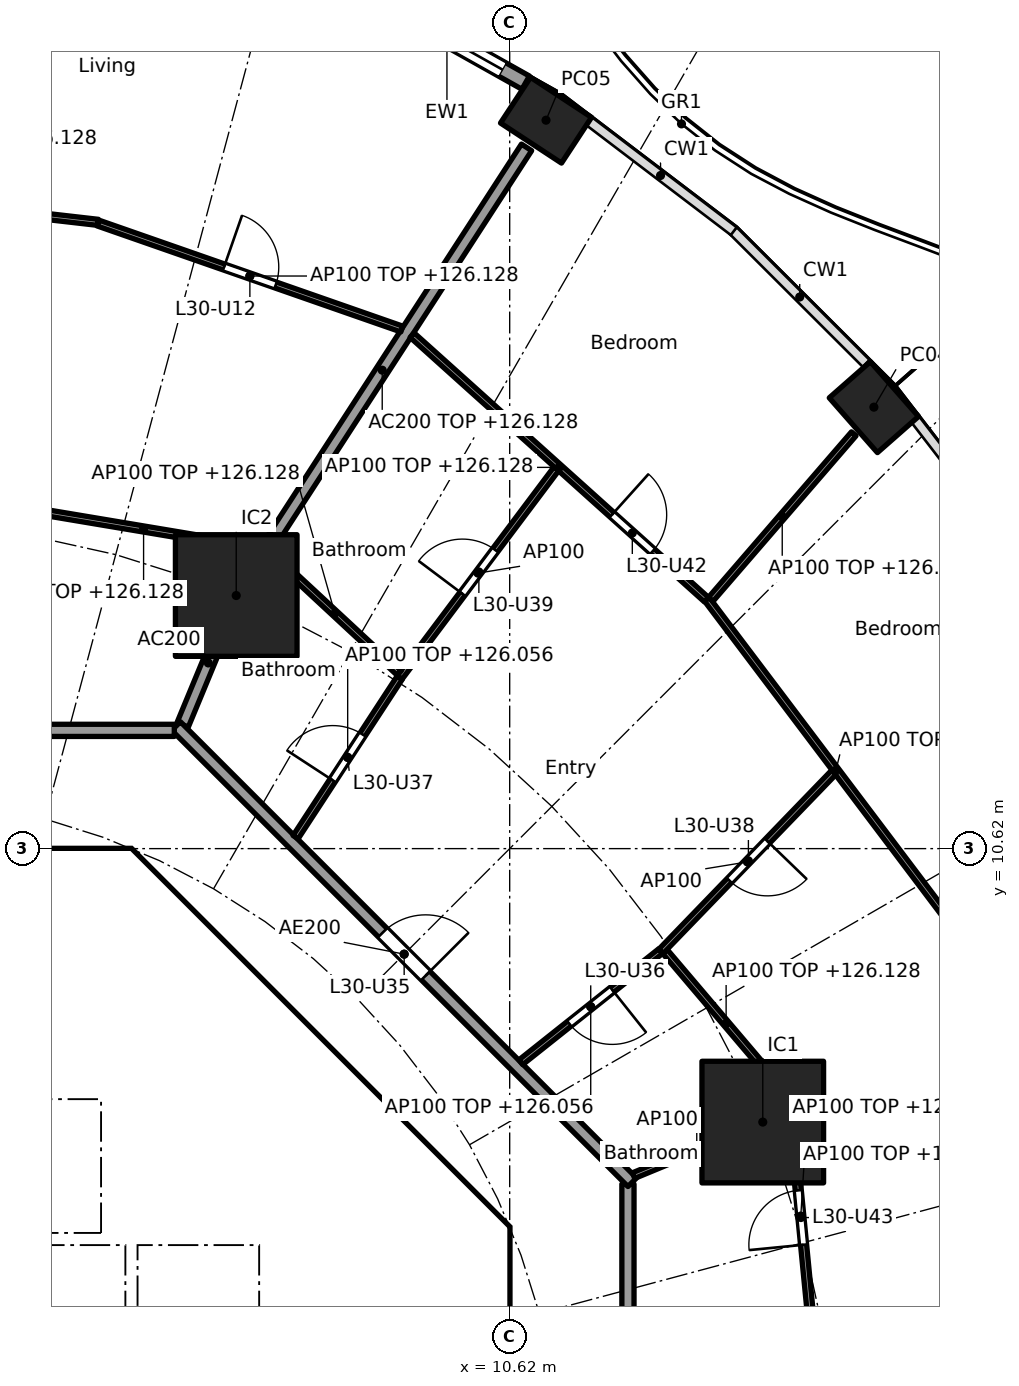
"""IFC4 building model, lengths in metres.
Left out: names, types, materials, properties, quantities, classifications, styles, units other than length and angle.
Written with IfcOpenShell. Run it as: python <this file> out.ifc"""

import sys

from ifc_helpers import new_model, si_unit, direction, frame, frame_2d, origin, origin_2d, place, context, subcontext, project, spatial, polyline, rectangle, hollow_rectangle, outline, extrude, element, fill, save


model = new_model("IFC4")
c1 = context("Model", 3, precision=1e-05, world=origin(), true_north=direction((0.0, 1.0)))
c2 = subcontext(c1, "Body", "Model", "MODEL_VIEW")
j1 = project(units=[si_unit("LENGTHUNIT", "METRE"), si_unit("PLANEANGLEUNIT", "RADIAN")], contexts=[c1])
p1 = place(None, origin())
s1 = spatial("IfcSite", under=j1, at=p1, CompositionType="ELEMENT")
p2 = place(p1, origin())
s2 = spatial("IfcBuilding", under=s1, at=p2, CompositionType="ELEMENT")
p3 = place(p2, frame((0.0, 0.0, 123.3)))
s3 = spatial("IfcBuildingStorey", under=s2, at=p3, CompositionType="ELEMENT", Elevation=123.3)
for number, where, z_axis, x_axis in (
    (1, (16.61, 17.88, 0.0), (0.0, 0.0, 1.0), (-0.66, 0.751, 0.0)),
    (2, (11.218, 22.599, 0.0), (0.0, 0.0, 1.0), (-0.836, 0.549, 0.0)),
):
    element("IfcColumn", number, at=place(p3, frame(where, z_axis=z_axis, x_axis=x_axis)), inside=s3, PredefinedType="COLUMN", context=c2, shape_type="SweptSolid", body=[
        extrude(hollow_rectangle(XDim=1.2, YDim=0.9, WallThickness=0.04, at=origin_2d()), origin(), (0.0, 0.0, 1.0), 3.7),
    ])
for number, where, z_axis, x_axis in (
    (3, (14.782, 6.123, 0.0), (0.0, 0.0, 1.0), (1.0, 0.0, 0.0)),
    (4, (6.123, 14.782, 0.0), (0.0, 0.0, 1.0), (1.0, 0.0, 0.0)),
):
    element("IfcColumn", number, at=place(p3, frame(where, z_axis=z_axis, x_axis=x_axis)), inside=s3, PredefinedType="COLUMN", context=c2, shape_type="SweptSolid", body=[
        extrude(rectangle(XDim=2.0, YDim=2.0, at=origin_2d()), origin(), (0.0, 0.0, 1.0), 3.7),
    ])
p4 = place(p3, frame((8.293, 24.67, 0.0), z_axis=(0.0, 0.0, 1.0), x_axis=(0.87206688547, -0.489386705241, 0.0)))
e5 = element("IfcWall", 5, at=p4, inside=s3, PredefinedType="SOLIDWALL", context=c2, shape_type="SweptSolid", body=[
    extrude(rectangle(XDim=2.97, YDim=0.25, at=frame_2d((1.485, 0.0))), origin(), (0.0, 0.0, 1.0), 3.44),
])
p5 = place(p4, frame((0.435, 0.0, 0.0)))
e6 = element("IfcOpeningElement", 6, at=p5, cuts=e5, PredefinedType="OPENING", context=c2, shape_type="SweptSolid", body=[
    extrude(rectangle(XDim=2.1, YDim=2.4, at=frame_2d((1.05, 1.2))), frame((0.0, 0.135, 0.0), z_axis=(0.0, -1.0, 0.0), x_axis=(1.0, 0.0, 0.0)), (0.0, 0.0, 1.0), 0.27),
])
p6 = place(p3, frame((9.988, 4.613, 0.0), z_axis=(0.0, 0.0, 1.0), x_axis=(-0.707106781187, 0.707106781187, 0.0)))
e7 = element("IfcWall", 7, at=p6, inside=s3, PredefinedType="SHEAR", context=c2, shape_type="SweptSolid", body=[
    extrude(rectangle(XDim=7.602, YDim=0.6, at=frame_2d((3.801, 0.0))), origin(), (0.0, 0.0, 1.0), 3.44),
])
p7 = place(p6, frame((3.201, 0.0, 0.0)))
e8 = element("IfcOpeningElement", 8, at=p7, cuts=e7, PredefinedType="OPENING", context=c2, shape_type="SweptSolid", body=[
    extrude(rectangle(XDim=1.2, YDim=2.1, at=frame_2d((0.6, 1.05))), frame((0.0, 0.31, 0.0), z_axis=(0.0, -1.0, 0.0), x_axis=(1.0, 0.0, 0.0)), (0.0, 0.0, 1.0), 0.62),
])
p8 = place(p3, frame((4.0, 4.3, 0.0), z_axis=(0.0, 0.0, 1.0), x_axis=(0.0, 1.0, 0.0)))
e9 = element("IfcWall", 9, at=p8, inside=s3, PredefinedType="SOLIDWALL", context=c2, shape_type="SweptSolid", body=[
    extrude(rectangle(XDim=2.2, YDim=0.2, at=frame_2d((1.1, 0.0))), origin(), (0.0, 0.0, 1.0), 3.44),
])
p9 = place(p8, frame((0.55, 0.0, 0.0)))
e10 = element("IfcOpeningElement", 10, at=p9, cuts=e9, PredefinedType="OPENING", context=c2, shape_type="SweptSolid", body=[
    extrude(rectangle(XDim=1.1, YDim=2.1, at=frame_2d((0.55, 1.05))), frame((0.0, 0.11, 0.0), z_axis=(0.0, -1.0, 0.0), x_axis=(1.0, 0.0, 0.0)), (0.0, 0.0, 1.0), 0.22),
])
p10 = place(p3, frame((6.7, 4.0, 0.0), z_axis=(0.0, 0.0, 1.0), x_axis=(1.0, 0.0, 0.0)))
e11 = element("IfcWall", 11, at=p10, inside=s3, PredefinedType="SOLIDWALL", context=c2, shape_type="SweptSolid", body=[
    extrude(rectangle(XDim=3.325, YDim=0.2, at=frame_2d((1.662, 0.0))), origin(), (0.0, 0.0, 1.0), 3.44),
])
p11 = place(p10, frame((1.25, 0.0, 0.0)))
e12 = element("IfcOpeningElement", 12, at=p11, cuts=e11, PredefinedType="OPENING", context=c2, shape_type="SweptSolid", body=[
    extrude(rectangle(XDim=1.1, YDim=2.1, at=frame_2d((0.55, 1.05))), frame((0.0, 0.11, 0.0), z_axis=(0.0, -1.0, 0.0), x_axis=(1.0, 0.0, 0.0)), (0.0, 0.0, 1.0), 0.22),
])
p12 = place(p3, frame((4.0, 7.025, 0.0), z_axis=(0.0, 0.0, 1.0), x_axis=(0.0, 1.0, 0.0)))
e13 = element("IfcWall", 13, at=p12, inside=s3, PredefinedType="SOLIDWALL", context=c2, shape_type="SweptSolid", body=[
    extrude(rectangle(XDim=3.0, YDim=0.2, at=frame_2d((1.5, 0.0))), origin(), (0.0, 0.0, 1.0), 3.44),
])
p13 = place(p12, frame((0.925, 0.0, 0.0)))
e14 = element("IfcOpeningElement", 14, at=p13, cuts=e13, PredefinedType="OPENING", context=c2, shape_type="SweptSolid", body=[
    extrude(rectangle(XDim=1.1, YDim=2.1, at=frame_2d((0.55, 1.05))), frame((0.0, 0.11, 0.0), z_axis=(0.0, -1.0, 0.0), x_axis=(1.0, 0.0, 0.0)), (0.0, 0.0, 1.0), 0.22),
])
p14 = place(p3, origin())
e15 = element("IfcWall", 15, at=p14, inside=s3, PredefinedType="SHEAR", context=c2, shape_type="SweptSolid", body=[
    extrude(outline(polyline([(-4.152, 10.025), (-4.401, 9.776), (-4.825, 10.2), (-4.401, 10.625), (4.401, 10.625), (4.825, 10.2), (4.401, 9.776), (4.152, 10.025), (-4.152, 10.025)])), origin(), (0.0, 0.0, 1.0), 3.44),
])
p15 = place(p3, origin())
e16 = element("IfcWall", 16, at=p15, inside=s3, PredefinedType="SHEAR", context=c2, shape_type="SweptSolid", body=[
    extrude(outline(polyline([(9.776, -4.401), (10.025, -4.152), (10.025, -3.801), (10.025, 4.152), (9.776, 4.401), (10.2, 4.825), (10.625, 4.401), (10.625, -4.401), (10.2, -4.825), (9.776, -4.401)])), origin(), (0.0, 0.0, 1.0), 3.44),
])
p16 = place(p3, origin())
e17 = element("IfcWall", 17, at=p16, inside=s3, PredefinedType="SOLIDWALL", context=c2, shape_type="SweptSolid", body=[
    extrude(outline(polyline([(-6.5, 2.1), (-6.7, 2.1), (-6.7, 4.3), (6.7, 4.3), (6.7, 2.1), (6.5, 2.1), (6.5, 4.1), (4.5, 4.1), (4.5, 2.1), (4.3, 2.1), (4.3, 4.1), (2.3, 4.1), (2.3, 2.1), (2.1, 2.1), (2.1, 4.1), (0.1, 4.1), (0.1, 2.1), (-0.1, 2.1), (-0.1, 4.1), (-2.1, 4.1), (-2.1, 2.1), (-2.3, 2.1), (-2.3, 4.1), (-4.3, 4.1), (-4.3, 2.1), (-4.5, 2.1), (-4.5, 4.1), (-6.5, 4.1), (-6.5, 2.1)])), origin(), (0.0, 0.0, 1.0), 3.44),
])
p17 = place(p3, origin())
e18 = element("IfcWall", 18, at=p17, inside=s3, PredefinedType="SOLIDWALL", context=c2, shape_type="SweptSolid", body=[
    extrude(outline(polyline([(4.1, 6.5), (-4.1, 6.5), (-4.1, 7.025), (4.1, 7.025), (4.1, 6.5)])), origin(), (0.0, 0.0, 1.0), 3.44),
])
p18 = place(p3, origin())
e19 = element("IfcWall", 19, at=p18, inside=s3, PredefinedType="SOLIDWALL", context=c2, shape_type="SweptSolid", body=[
    extrude(outline(polyline([(7.025, -3.9), (6.7, -3.9), (6.7, 3.9), (7.025, 3.9), (7.025, -3.9)])), origin(), (0.0, 0.0, 1.0), 3.44),
])
p19 = place(p3, frame((5.243, 12.657, 0.0), z_axis=(0.0, 0.0, 1.0), x_axis=(0.38273085373, 0.923859888513, 0.0)))
e20 = element("IfcWall", 20, at=p19, inside=s3, PredefinedType="PARTITIONING", context=c2, shape_type="SweptSolid", body=[
    extrude(rectangle(XDim=2.199, YDim=0.2, at=frame_2d((1.1, 0.0))), origin(), (0.0, 0.0, 1.0), 3.44),
])
p20 = place(p3, frame((6.15, 14.824, 0.0), z_axis=(0.0, 0.0, 1.0), x_axis=(0.543695254109, 0.839282711998, 0.0)))
e21 = element("IfcWall", 21, at=p20, inside=s3, PredefinedType="PARTITIONING", context=c2, shape_type="SweptSolid", body=[
    extrude(rectangle(XDim=8.731, YDim=0.2, at=frame_2d((4.366, 0.0))), origin(), (0.0, 0.0, 1.0), 2.828),
])
p21 = place(p3, frame((12.565, -5.104, 0.0), z_axis=(0.0, 0.0, 1.0), x_axis=(0.0, 1.0, 0.0)))
e22 = element("IfcWall", 22, at=p21, inside=s3, PredefinedType="PARTITIONING", context=c2, shape_type="SweptSolid", body=[
    extrude(rectangle(XDim=10.209, YDim=0.2, at=frame_2d((5.104, 0.0))), origin(), (0.0, 0.0, 1.0), 3.44),
])
p22 = place(p3, frame((12.635, 5.134, 0.0), z_axis=(0.0, 0.0, 1.0), x_axis=(-0.707106781187, 0.707106781187, 0.0)))
e23 = element("IfcWall", 23, at=p22, inside=s3, PredefinedType="PARTITIONING", context=c2, shape_type="SweptSolid", body=[
    extrude(rectangle(XDim=10.609, YDim=0.2, at=frame_2d((5.305, 0.0))), origin(), (0.0, 0.0, 1.0), 3.44),
])
p23 = place(p22, frame((4.804, 0.0, 0.0)))
e24 = element("IfcOpeningElement", 24, at=p23, cuts=e23, PredefinedType="OPENING", context=c2, shape_type="SweptSolid", body=[
    extrude(rectangle(XDim=1.0, YDim=2.1, at=frame_2d((0.5, 1.05))), frame((0.0, 0.11, 0.0), z_axis=(0.0, -1.0, 0.0), x_axis=(1.0, 0.0, 0.0)), (0.0, 0.0, 1.0), 0.22),
])
p24 = place(p3, frame((5.104, 12.565, 0.0), z_axis=(0.0, 0.0, 1.0), x_axis=(-1.0, 0.0, 0.0)))
e25 = element("IfcWall", 25, at=p24, inside=s3, PredefinedType="PARTITIONING", context=c2, shape_type="SweptSolid", body=[
    extrude(rectangle(XDim=10.409, YDim=0.2, at=frame_2d((5.205, 0.0))), origin(), (0.0, 0.0, 1.0), 3.44),
])
p25 = place(p3, frame((15.602, 2.584, 0.0), z_axis=(0.0, 0.0, 1.0), x_axis=(-0.097216297846, 0.995263277446, 0.0)))
e26 = element("IfcWall", 26, at=p25, inside=s3, PredefinedType="PARTITIONING", context=c2, shape_type="SweptSolid", body=[
    extrude(rectangle(XDim=4.006, YDim=0.1, at=frame_2d((2.003, 0.0))), origin(), (0.0, 0.0, 1.0), 2.828),
])
p26 = place(p25, frame((1.528, 0.0, 0.0)))
e27 = element("IfcOpeningElement", 27, at=p26, cuts=e26, PredefinedType="OPENING", context=c2, shape_type="SweptSolid", body=[
    extrude(rectangle(XDim=0.9, YDim=2.1, at=frame_2d((0.45, 1.05))), frame((0.0, 0.06, 0.0), z_axis=(0.0, -1.0, 0.0), x_axis=(1.0, 0.0, 0.0)), (0.0, 0.0, 1.0), 0.12),
])
p27 = place(p3, frame((12.657, 5.243, 0.0), z_axis=(0.0, 0.0, 1.0), x_axis=(0.923864733477, 0.382719158442, 0.0)))
e28 = element("IfcWall", 28, at=p27, inside=s3, PredefinedType="PARTITIONING", context=c2, shape_type="SweptSolid", body=[
    extrude(rectangle(XDim=2.25, YDim=0.1, at=frame_2d((1.125, 0.0))), origin(), (0.0, 0.0, 1.0), 3.44),
])
p28 = place(p3, frame((15.185, 6.559, 0.0), z_axis=(0.0, 0.0, 1.0), x_axis=(-0.647360926376, 0.762183594026, 0.0)))
e29 = element("IfcWall", 29, at=p28, inside=s3, PredefinedType="PARTITIONING", context=c2, shape_type="SweptSolid", body=[
    extrude(rectangle(XDim=3.106, YDim=0.1, at=frame_2d((1.553, 0.0))), origin(), (0.0, 0.0, 1.0), 2.828),
])
p29 = place(p3, frame((18.106, 9.098, 0.0), z_axis=(0.0, 0.0, 1.0), x_axis=(-0.602398572907, 0.798195439325, 0.0)))
e30 = element("IfcWall", 30, at=p29, inside=s3, PredefinedType="PARTITIONING", context=c2, shape_type="SweptSolid", body=[
    extrude(rectangle(XDim=7.044, YDim=0.1, at=frame_2d((3.522, 0.0))), origin(), (0.0, 0.0, 1.0), 2.828),
])
p30 = place(p3, frame((10.803, 7.107, 0.0), z_axis=(0.0, 0.0, 1.0), x_axis=(0.782908385935, 0.622137010017, 0.0)))
e31 = element("IfcWall", 31, at=p30, inside=s3, PredefinedType="PARTITIONING", context=c2, shape_type="SweptSolid", body=[
    extrude(rectangle(XDim=2.937, YDim=0.1, at=frame_2d((1.469, 0.0))), origin(), (0.0, 0.0, 1.0), 2.756),
])
p31 = place(p30, frame((1.019, 0.0, 0.0)))
e32 = element("IfcOpeningElement", 32, at=p31, cuts=e31, PredefinedType="OPENING", context=c2, shape_type="SweptSolid", body=[
    extrude(rectangle(XDim=0.9, YDim=2.1, at=frame_2d((0.45, 1.05))), frame((0.0, 0.06, 0.0), z_axis=(0.0, -1.0, 0.0), x_axis=(1.0, 0.0, 0.0)), (0.0, 0.0, 1.0), 0.12),
])
p32 = place(p3, frame((13.107, 8.929, 0.0), z_axis=(0.0, 0.0, 1.0), x_axis=(0.694592384931, 0.719403515974, 0.0)))
e33 = element("IfcWall", 33, at=p32, inside=s3, PredefinedType="PARTITIONING", context=c2, shape_type="SweptSolid", body=[
    extrude(rectangle(XDim=4.094, YDim=0.1, at=frame_2d((2.047, 0.0))), origin(), (0.0, 0.0, 1.0), 3.44),
])
p33 = place(p32, frame((1.622, 0.0, 0.0)))
e34 = element("IfcOpeningElement", 34, at=p33, cuts=e33, PredefinedType="OPENING", context=c2, shape_type="SweptSolid", body=[
    extrude(rectangle(XDim=0.9, YDim=2.1, at=frame_2d((0.45, 1.05))), frame((0.0, 0.06, 0.0), z_axis=(0.0, -1.0, 0.0), x_axis=(1.0, 0.0, 0.0)), (0.0, 0.0, 1.0), 0.12),
])
p34 = place(p3, frame((13.926, 14.719, 0.0), z_axis=(0.0, 0.0, 1.0), x_axis=(0.653831857253, 0.756639876323, 0.0)))
e35 = element("IfcWall", 35, at=p34, inside=s3, PredefinedType="PARTITIONING", context=c2, shape_type="SweptSolid", body=[
    extrude(rectangle(XDim=3.598, YDim=0.1, at=frame_2d((1.799, 0.0))), origin(), (0.0, 0.0, 1.0), 2.828),
])
p35 = place(p3, frame((13.856, 14.714, 0.0), z_axis=(0.0, 0.0, 1.0), x_axis=(-0.743799395746, 0.668402916577, 0.0)))
e36 = element("IfcWall", 36, at=p35, inside=s3, PredefinedType="PARTITIONING", context=c2, shape_type="SweptSolid", body=[
    extrude(rectangle(XDim=6.509, YDim=0.1, at=frame_2d((3.254, 0.0))), origin(), (0.0, 0.0, 1.0), 2.828),
])
p36 = place(p35, frame((1.19, 0.0, 0.0)))
e37 = element("IfcOpeningElement", 37, at=p36, cuts=e36, PredefinedType="OPENING", context=c2, shape_type="SweptSolid", body=[
    extrude(rectangle(XDim=0.9, YDim=2.1, at=frame_2d((0.45, 1.05))), frame((0.0, 0.06, 0.0), z_axis=(0.0, -1.0, 0.0), x_axis=(1.0, 0.0, 0.0)), (0.0, 0.0, 1.0), 0.12),
])
p37 = place(p3, frame((7.099, 10.808, 0.0), z_axis=(0.0, 0.0, 1.0), x_axis=(0.546709757921, 0.837322184463, 0.0)))
e38 = element("IfcWall", 38, at=p37, inside=s3, PredefinedType="PARTITIONING", context=c2, shape_type="SweptSolid", body=[
    extrude(rectangle(XDim=3.134, YDim=0.1, at=frame_2d((1.567, 0.0))), origin(), (0.0, 0.0, 1.0), 2.756),
])
p38 = place(p37, frame((1.117, 0.0, 0.0)))
e39 = element("IfcOpeningElement", 39, at=p38, cuts=e38, PredefinedType="OPENING", context=c2, shape_type="SweptSolid", body=[
    extrude(rectangle(XDim=0.9, YDim=2.1, at=frame_2d((0.45, 1.05))), frame((0.0, 0.06, 0.0), z_axis=(0.0, -1.0, 0.0), x_axis=(1.0, 0.0, 0.0)), (0.0, 0.0, 1.0), 0.12),
])
p39 = place(p3, frame((8.81, 13.434, 0.0), z_axis=(0.0, 0.0, 1.0), x_axis=(0.600491337497, 0.799631261014, 0.0)))
e40 = element("IfcWall", 40, at=p39, inside=s3, PredefinedType="PARTITIONING", context=c2, shape_type="SweptSolid", body=[
    extrude(rectangle(XDim=4.292, YDim=0.1, at=frame_2d((2.146, 0.0))), origin(), (0.0, 0.0, 1.0), 3.44),
])
p40 = place(p39, frame((1.721, 0.0, 0.0)))
e41 = element("IfcOpeningElement", 41, at=p40, cuts=e40, PredefinedType="OPENING", context=c2, shape_type="SweptSolid", body=[
    extrude(rectangle(XDim=0.9, YDim=2.1, at=frame_2d((0.45, 1.05))), frame((0.0, 0.06, 0.0), z_axis=(0.0, -1.0, 0.0), x_axis=(1.0, 0.0, 0.0)), (0.0, 0.0, 1.0), 0.12),
])
p41 = place(p3, frame((8.803, 13.508, 0.0), z_axis=(0.0, 0.0, 1.0), x_axis=(-0.733124766325, 0.680094167745, 0.0)))
e42 = element("IfcWall", 42, at=p41, inside=s3, PredefinedType="PARTITIONING", context=c2, shape_type="SweptSolid", body=[
    extrude(rectangle(XDim=2.886, YDim=0.1, at=frame_2d((1.443, 0.0))), origin(), (0.0, 0.0, 1.0), 2.828),
])
p42 = place(p3, frame((6.515, 15.556, 0.0), z_axis=(0.0, 0.0, 1.0), x_axis=(-0.986271328884, 0.16513287323, 0.0)))
e43 = element("IfcWall", 43, at=p42, inside=s3, PredefinedType="PARTITIONING", context=c2, shape_type="SweptSolid", body=[
    extrude(rectangle(XDim=3.884, YDim=0.1, at=frame_2d((1.942, 0.0))), origin(), (0.0, 0.0, 1.0), 2.828),
])
p43 = place(p3, frame((8.846, 19.165, 0.0), z_axis=(0.0, 0.0, 1.0), x_axis=(-0.944186503813, 0.329411362915, 0.0)))
e44 = element("IfcWall", 44, at=p43, inside=s3, PredefinedType="PARTITIONING", context=c2, shape_type="SweptSolid", body=[
    extrude(rectangle(XDim=5.293, YDim=0.1, at=frame_2d((2.646, 0.0))), origin(), (0.0, 0.0, 1.0), 2.828),
])
p44 = place(p43, frame((2.197, 0.0, 0.0)))
e45 = element("IfcOpeningElement", 45, at=p44, cuts=e44, PredefinedType="OPENING", context=c2, shape_type="SweptSolid", body=[
    extrude(rectangle(XDim=0.9, YDim=2.1, at=frame_2d((0.45, 1.05))), frame((0.0, 0.06, 0.0), z_axis=(0.0, -1.0, 0.0), x_axis=(1.0, 0.0, 0.0)), (0.0, 0.0, 1.0), 0.12),
])
p45 = place(p3, frame((3.851, 20.919, 0.0), z_axis=(0.0, 0.0, 1.0), x_axis=(-0.993519908136, 0.11365822512, 0.0)))
e46 = element("IfcWall", 46, at=p45, inside=s3, PredefinedType="PARTITIONING", context=c2, shape_type="SweptSolid", body=[
    extrude(rectangle(XDim=5.613, YDim=0.1, at=frame_2d((2.806, 0.0))), origin(), (0.0, 0.0, 1.0), 2.828),
])
p46 = place(p5, origin())
e47 = element("IfcDoor", 47, at=p46, inside=s3, OperationType="SLIDING_TO_LEFT", PredefinedType="DOOR", context=c2, shape_type="SweptSolid", body=[
    extrude(rectangle(XDim=2.1, YDim=2.4, at=frame_2d((1.05, 1.2))), frame((0.0, 0.025, 0.0), z_axis=(0.0, -1.0, 0.0), x_axis=(1.0, 0.0, 0.0)), (0.0, 0.0, 1.0), 0.05),
])
fill(e6, e47)
p47 = place(p9, origin())
e48 = element("IfcDoor", 48, at=p47, inside=s3, OperationType="DOUBLE_DOOR_SLIDING", PredefinedType="DOOR", context=c2, shape_type="SweptSolid", body=[
    extrude(rectangle(XDim=1.1, YDim=2.1, at=frame_2d((0.55, 1.05))), frame((0.0, 0.025, 0.0), z_axis=(0.0, -1.0, 0.0), x_axis=(1.0, 0.0, 0.0)), (0.0, 0.0, 1.0), 0.05),
])
fill(e10, e48)
p48 = place(p11, frame((1.1, 0.0, 0.0), x_axis=(-1.0, 0.0, 0.0)))
e49 = element("IfcDoor", 49, at=p48, inside=s3, OperationType="SINGLE_SWING_LEFT", PredefinedType="DOOR", context=c2, shape_type="SweptSolid", body=[
    extrude(rectangle(XDim=1.1, YDim=2.1, at=frame_2d((0.55, 1.05))), frame((0.0, 0.025, 0.0), z_axis=(0.0, -1.0, 0.0), x_axis=(1.0, 0.0, 0.0)), (0.0, 0.0, 1.0), 0.05),
])
fill(e12, e49)
p49 = place(p13, origin())
e50 = element("IfcDoor", 50, at=p49, inside=s3, OperationType="SINGLE_SWING_RIGHT", PredefinedType="DOOR", context=c2, shape_type="SweptSolid", body=[
    extrude(rectangle(XDim=1.1, YDim=2.1, at=frame_2d((0.55, 1.05))), frame((0.0, 0.025, 0.0), z_axis=(0.0, -1.0, 0.0), x_axis=(1.0, 0.0, 0.0)), (0.0, 0.0, 1.0), 0.05),
])
fill(e14, e50)
p50 = place(p7, origin())
e51 = element("IfcDoor", 51, at=p50, inside=s3, OperationType="SINGLE_SWING_RIGHT", PredefinedType="DOOR", context=c2, shape_type="SweptSolid", body=[
    extrude(rectangle(XDim=1.2, YDim=2.1, at=frame_2d((0.6, 1.05))), frame((0.0, 0.025, 0.0), z_axis=(0.0, -1.0, 0.0), x_axis=(1.0, 0.0, 0.0)), (0.0, 0.0, 1.0), 0.05),
])
fill(e8, e51)
p51 = place(p44, frame((0.9, 0.0, 0.0), x_axis=(-1.0, 0.0, 0.0)))
e52 = element("IfcDoor", 52, at=p51, inside=s3, OperationType="SINGLE_SWING_LEFT", PredefinedType="DOOR", context=c2, shape_type="SweptSolid", body=[
    extrude(rectangle(XDim=0.9, YDim=2.1, at=frame_2d((0.45, 1.05))), frame((0.0, 0.025, 0.0), z_axis=(0.0, -1.0, 0.0), x_axis=(1.0, 0.0, 0.0)), (0.0, 0.0, 1.0), 0.05),
])
fill(e45, e52)
p52 = place(p23, frame((1.0, 0.0, 0.0), x_axis=(-1.0, 0.0, 0.0)))
e53 = element("IfcDoor", 53, at=p52, inside=s3, OperationType="SINGLE_SWING_RIGHT", PredefinedType="DOOR", context=c2, shape_type="SweptSolid", body=[
    extrude(rectangle(XDim=1.0, YDim=2.1, at=frame_2d((0.5, 1.05))), frame((0.0, 0.025, 0.0), z_axis=(0.0, -1.0, 0.0), x_axis=(1.0, 0.0, 0.0)), (0.0, 0.0, 1.0), 0.05),
])
fill(e24, e53)
p53 = place(p31, frame((0.9, 0.0, 0.0), x_axis=(-1.0, 0.0, 0.0)))
e54 = element("IfcDoor", 54, at=p53, inside=s3, OperationType="SINGLE_SWING_LEFT", PredefinedType="DOOR", context=c2, shape_type="SweptSolid", body=[
    extrude(rectangle(XDim=0.9, YDim=2.1, at=frame_2d((0.45, 1.05))), frame((0.0, 0.025, 0.0), z_axis=(0.0, -1.0, 0.0), x_axis=(1.0, 0.0, 0.0)), (0.0, 0.0, 1.0), 0.05),
])
fill(e32, e54)
p54 = place(p38, origin())
e55 = element("IfcDoor", 55, at=p54, inside=s3, OperationType="SINGLE_SWING_LEFT", PredefinedType="DOOR", context=c2, shape_type="SweptSolid", body=[
    extrude(rectangle(XDim=0.9, YDim=2.1, at=frame_2d((0.45, 1.05))), frame((0.0, 0.025, 0.0), z_axis=(0.0, -1.0, 0.0), x_axis=(1.0, 0.0, 0.0)), (0.0, 0.0, 1.0), 0.05),
])
fill(e39, e55)
p55 = place(p33, frame((0.9, 0.0, 0.0), x_axis=(-1.0, 0.0, 0.0)))
e56 = element("IfcDoor", 56, at=p55, inside=s3, OperationType="SINGLE_SWING_LEFT", PredefinedType="DOOR", context=c2, shape_type="SweptSolid", body=[
    extrude(rectangle(XDim=0.9, YDim=2.1, at=frame_2d((0.45, 1.05))), frame((0.0, 0.025, 0.0), z_axis=(0.0, -1.0, 0.0), x_axis=(1.0, 0.0, 0.0)), (0.0, 0.0, 1.0), 0.05),
])
fill(e34, e56)
p56 = place(p40, origin())
e57 = element("IfcDoor", 57, at=p56, inside=s3, OperationType="SINGLE_SWING_LEFT", PredefinedType="DOOR", context=c2, shape_type="SweptSolid", body=[
    extrude(rectangle(XDim=0.9, YDim=2.1, at=frame_2d((0.45, 1.05))), frame((0.0, 0.025, 0.0), z_axis=(0.0, -1.0, 0.0), x_axis=(1.0, 0.0, 0.0)), (0.0, 0.0, 1.0), 0.05),
])
fill(e41, e57)
p57 = place(p36, frame((0.9, 0.0, 0.0), x_axis=(-1.0, 0.0, 0.0)))
e58 = element("IfcDoor", 58, at=p57, inside=s3, OperationType="SINGLE_SWING_LEFT", PredefinedType="DOOR", context=c2, shape_type="SweptSolid", body=[
    extrude(rectangle(XDim=0.9, YDim=2.1, at=frame_2d((0.45, 1.05))), frame((0.0, 0.025, 0.0), z_axis=(0.0, -1.0, 0.0), x_axis=(1.0, 0.0, 0.0)), (0.0, 0.0, 1.0), 0.05),
])
fill(e37, e58)
p58 = place(p26, origin())
e59 = element("IfcDoor", 59, at=p58, inside=s3, OperationType="SINGLE_SWING_LEFT", PredefinedType="DOOR", context=c2, shape_type="SweptSolid", body=[
    extrude(rectangle(XDim=0.9, YDim=2.1, at=frame_2d((0.45, 1.05))), frame((0.0, 0.025, 0.0), z_axis=(0.0, -1.0, 0.0), x_axis=(1.0, 0.0, 0.0)), (0.0, 0.0, 1.0), 0.05),
])
fill(e27, e59)
save(model, sys.argv[1])
